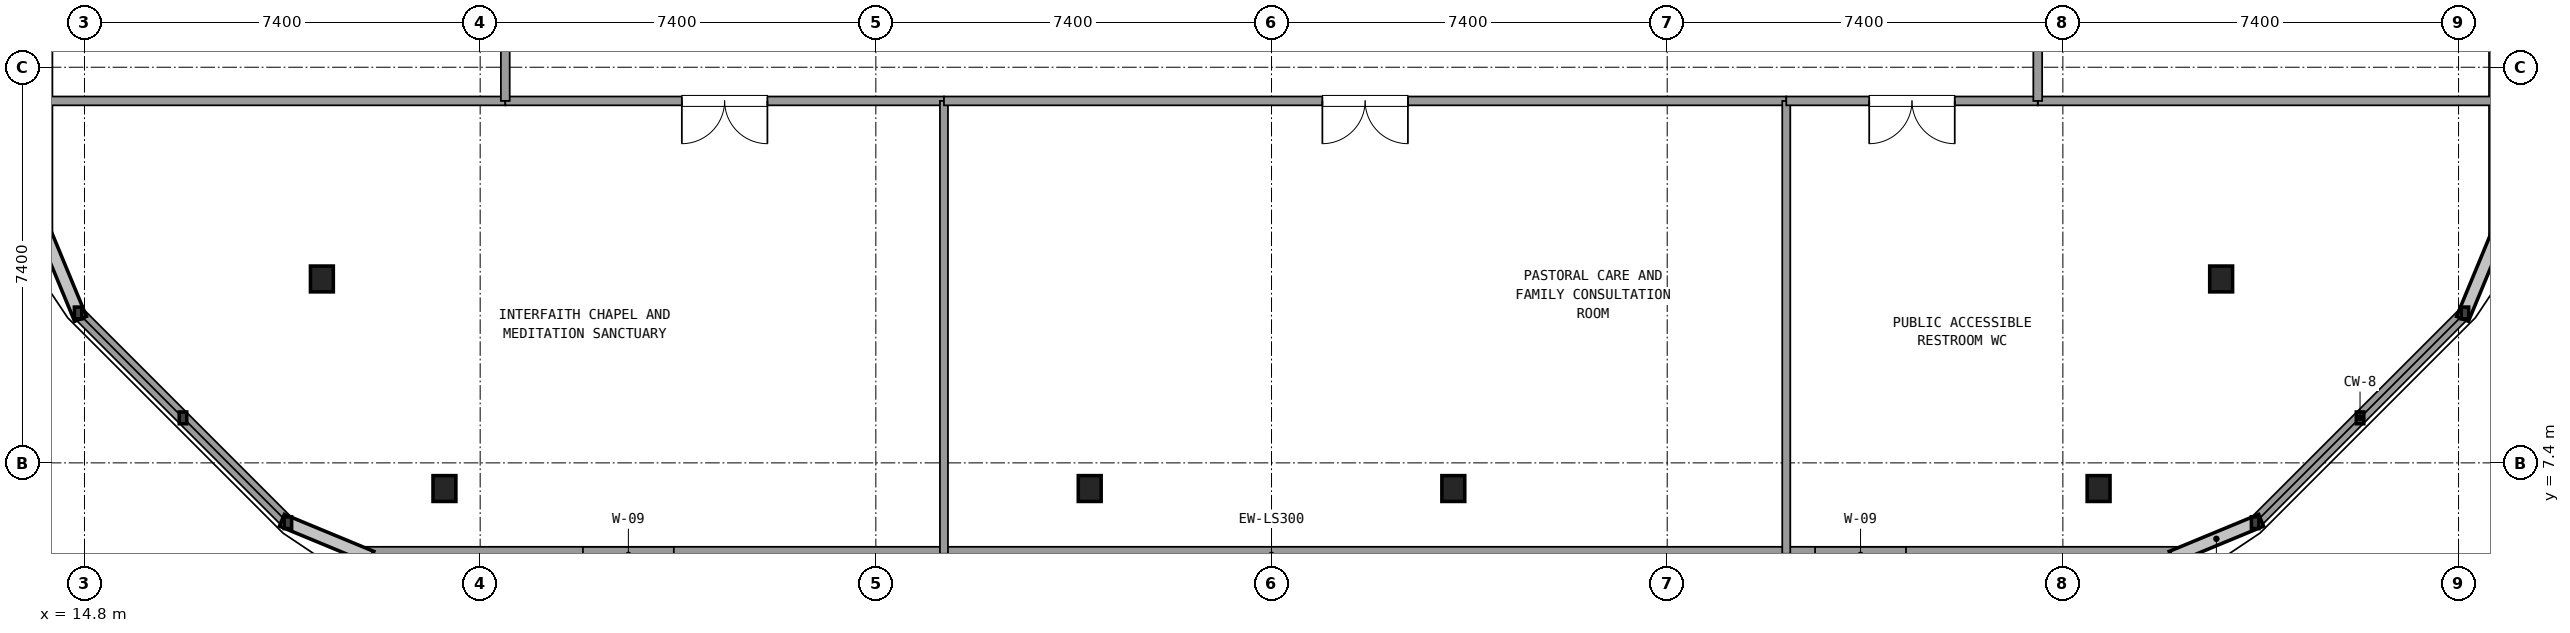
"""IFC4 building model, lengths in metres.
Left out: names, types, materials, properties, quantities, classifications, styles, units other than length and angle.
Written with IfcOpenShell. Run it as: python <this file> out.ifc"""

import sys

from ifc_helpers import new_model, si_unit, direction, frame, frame_2d, origin, origin_2d, place, context, subcontext, project, spatial, rectangle, i_section, extrude, element, fill, save


model = new_model("IFC4")
c1 = context("Model", 3, precision=1e-05, world=origin(), true_north=direction((0.0, 1.0)))
c2 = subcontext(c1, "Body", "Model", "MODEL_VIEW")
j1 = project(units=[si_unit("LENGTHUNIT", "METRE"), si_unit("PLANEANGLEUNIT", "RADIAN")], contexts=[c1])
p1 = place(None, origin())
s1 = spatial("IfcSite", under=j1, at=p1, CompositionType="ELEMENT")
p2 = place(p1, origin())
s2 = spatial("IfcBuilding", under=s1, at=p2, CompositionType="ELEMENT")
p3 = place(p2, frame((0.0, 0.0, 290.34)))
s3 = spatial("IfcBuildingStorey", under=s2, at=p3, CompositionType="ELEMENT", Elevation=290.34)
for number, where, z_axis, x_axis in (
    (1, (19.24, 10.84, 0.0), (0.0, 0.0, 1.0), (1.0, 0.0, 0.0)),
    (2, (21.532, 6.92, 0.0), (0.0, 0.0, 1.0), (1.0, 0.0, 0.0)),
    (3, (33.6, 6.92, 0.0), (0.0, 0.0, 1.0), (1.0, 0.0, 0.0)),
    (4, (40.4, 6.92, 0.0), (0.0, 0.0, 1.0), (1.0, 0.0, 0.0)),
    (5, (52.468, 6.92, 0.0), (0.0, 0.0, 1.0), (1.0, 0.0, 0.0)),
    (6, (54.76, 10.84, 0.0), (0.0, 0.0, 1.0), (1.0, 0.0, 0.0)),
):
    element("IfcColumn", number, at=place(p3, frame(where, z_axis=z_axis, x_axis=x_axis)), inside=s3, PredefinedType="COLUMN", context=c2, shape_type="SweptSolid", body=[
        extrude(i_section(OverallWidth=0.428, OverallDepth=0.483, WebThickness=0.042, FlangeThickness=0.068, at=origin_2d()), origin(), (0.0, 0.0, 1.0), 4.32),
    ])
p4 = place(p3, frame((20.055, 5.68, 0.0), z_axis=(0.0, 0.0, 1.0), x_axis=(1.0, 0.0, 0.0)))
e7 = element("IfcWall", 7, at=p4, inside=s3, PredefinedType="SOLIDWALL", context=c2, shape_type="SweptSolid", body=[
    extrude(rectangle(XDim=33.89, YDim=0.3, at=frame_2d((16.945, 0.0))), origin(), (0.0, 0.0, 1.0), 3.46),
])
p5 = place(p4, frame((4.067, 0.0, 0.85)))
e8 = element("IfcOpeningElement", 8, at=p5, cuts=e7, PredefinedType="OPENING", context=c2, shape_type="SweptSolid", body=[
    extrude(rectangle(XDim=1.7, YDim=1.75, at=frame_2d((0.85, 0.875))), frame((0.0, 0.16, 0.0), z_axis=(0.0, -1.0, 0.0), x_axis=(1.0, 0.0, 0.0)), (0.0, 0.0, 1.0), 0.32),
])
p6 = place(p4, frame((27.111, 0.0, 0.85)))
e9 = element("IfcOpeningElement", 9, at=p6, cuts=e7, PredefinedType="OPENING", context=c2, shape_type="SweptSolid", body=[
    extrude(rectangle(XDim=1.7, YDim=1.75, at=frame_2d((0.85, 0.875))), frame((0.0, 0.16, 0.0), z_axis=(0.0, -1.0, 0.0), x_axis=(1.0, 0.0, 0.0)), (0.0, 0.0, 1.0), 0.32),
])
p7 = place(p3, frame((55.396, 6.281, 0.0), z_axis=(0.0, 0.0, 1.0), x_axis=(0.707106781187, 0.707106781187, 0.0)))
e10 = element("IfcWall", 10, at=p7, inside=s3, PredefinedType="SOLIDWALL", context=c2, shape_type="SweptSolid", body=[
    extrude(rectangle(XDim=5.548, YDim=0.24, at=frame_2d((2.774, 0.0))), origin(), (0.0, 0.0, 1.0), 0.85),
])
p8 = place(p3, frame((59.92, 11.655, 0.0), z_axis=(0.0, 0.0, 1.0), x_axis=(0.0, 1.0, 0.0)))
e11 = element("IfcWall", 11, at=p8, inside=s3, PredefinedType="SOLIDWALL", context=c2, shape_type="SweptSolid", body=[
    extrude(rectangle(XDim=28.49, YDim=0.3, at=frame_2d((14.245, 0.0))), origin(), (0.0, 0.0, 1.0), 3.46),
])
p9 = place(p8, frame((7.122, 0.0, 0.85)))
e12 = element("IfcOpeningElement", 12, at=p9, cuts=e11, PredefinedType="OPENING", context=c2, shape_type="SweptSolid", body=[
    extrude(rectangle(XDim=1.9, YDim=1.7, at=frame_2d((0.95, 0.85))), frame((0.0, 0.16, 0.0), z_axis=(0.0, -1.0, 0.0), x_axis=(1.0, 0.0, 0.0)), (0.0, 0.0, 1.0), 0.32),
])
p10 = place(p8, frame((18.518, 0.0, 0.85)))
e13 = element("IfcOpeningElement", 13, at=p10, cuts=e11, PredefinedType="OPENING", context=c2, shape_type="SweptSolid", body=[
    extrude(rectangle(XDim=1.9, YDim=1.7, at=frame_2d((0.95, 0.85))), frame((0.0, 0.16, 0.0), z_axis=(0.0, -1.0, 0.0), x_axis=(1.0, 0.0, 0.0)), (0.0, 0.0, 1.0), 0.32),
])
p11 = place(p3, frame((14.08, 21.25, 0.0), z_axis=(0.0, 0.0, 1.0), x_axis=(0.0, -1.0, 0.0)))
e14 = element("IfcWall", 14, at=p11, inside=s3, PredefinedType="SOLIDWALL", context=c2, shape_type="SweptSolid", body=[
    extrude(rectangle(XDim=9.595, YDim=0.24, at=frame_2d((4.797, 0.0))), origin(), (0.0, 0.0, 1.0), 0.85),
])
p12 = place(p3, frame((14.681, 10.204, 0.0), z_axis=(0.0, 0.0, 1.0), x_axis=(0.707106781187, -0.707106781187, 0.0)))
e15 = element("IfcWall", 15, at=p12, inside=s3, PredefinedType="SOLIDWALL", context=c2, shape_type="SweptSolid", body=[
    extrude(rectangle(XDim=5.548, YDim=0.24, at=frame_2d((2.774, 0.0))), origin(), (0.0, 0.0, 1.0), 0.85),
])
for number, where, z_axis, x_axis in (
    (16, (14.1, 14.17, 0.0), (0.0, 0.0, 1.0), (1.0, 0.0, 0.0)),
    (17, (51.33, 14.17, 0.0), (0.0, 0.0, 1.0), (1.0, 0.0, 0.0)),
):
    element("IfcWall", number, at=place(p3, frame(where, z_axis=z_axis, x_axis=x_axis)), inside=s3, PredefinedType="PARTITIONING", context=c2, shape_type="SweptSolid", body=[
        extrude(rectangle(XDim=8.57, YDim=0.165, at=frame_2d((4.285, 0.0))), origin(), (0.0, 0.0, 1.0), 2.93),
    ])
p13 = place(p3, frame((22.67, 14.17, 0.0), z_axis=(0.0, 0.0, 1.0), x_axis=(1.0, 0.0, 0.0)))
e18 = element("IfcWall", 18, at=p13, inside=s3, PredefinedType="PARTITIONING", context=c2, shape_type="SweptSolid", body=[
    extrude(rectangle(XDim=8.204, YDim=0.165, at=frame_2d((4.102, 0.0))), origin(), (0.0, 0.0, 1.0), 2.93),
])
p14 = place(p13, frame((3.302, 0.0, 0.0)))
e19 = element("IfcOpeningElement", 19, at=p14, cuts=e18, PredefinedType="OPENING", context=c2, shape_type="SweptSolid", body=[
    extrude(rectangle(XDim=1.6, YDim=2.2, at=frame_2d((0.8, 1.1))), frame((0.0, 0.093, 0.0), z_axis=(0.0, -1.0, 0.0), x_axis=(1.0, 0.0, 0.0)), (0.0, 0.0, 1.0), 0.185),
])
p15 = place(p3, frame((30.874, 14.17, 0.0), z_axis=(0.0, 0.0, 1.0), x_axis=(0.0, -1.0, 0.0)))
e20 = element("IfcWall", 20, at=p15, inside=s3, PredefinedType="PARTITIONING", context=c2, shape_type="SweptSolid", body=[
    extrude(rectangle(XDim=8.47, YDim=0.15, at=frame_2d((4.235, 0.0))), origin(), (0.0, 0.0, 1.0), 2.93),
])
p16 = place(p3, frame((30.874, 14.17, 0.0), z_axis=(0.0, 0.0, 1.0), x_axis=(1.0, 0.0, 0.0)))
e21 = element("IfcWall", 21, at=p16, inside=s3, PredefinedType="PARTITIONING", context=c2, shape_type="SweptSolid", body=[
    extrude(rectangle(XDim=15.753, YDim=0.165, at=frame_2d((7.876, 0.0))), origin(), (0.0, 0.0, 1.0), 2.93),
])
p17 = place(p16, frame((7.077, 0.0, 0.0)))
e22 = element("IfcOpeningElement", 22, at=p17, cuts=e21, PredefinedType="OPENING", context=c2, shape_type="SweptSolid", body=[
    extrude(rectangle(XDim=1.6, YDim=2.2, at=frame_2d((0.8, 1.1))), frame((0.0, 0.093, 0.0), z_axis=(0.0, -1.0, 0.0), x_axis=(1.0, 0.0, 0.0)), (0.0, 0.0, 1.0), 0.185),
])
p18 = place(p3, frame((46.627, 14.17, 0.0), z_axis=(0.0, 0.0, 1.0), x_axis=(0.0, -1.0, 0.0)))
e23 = element("IfcWall", 23, at=p18, inside=s3, PredefinedType="PARTITIONING", context=c2, shape_type="SweptSolid", body=[
    extrude(rectangle(XDim=8.47, YDim=0.15, at=frame_2d((4.235, 0.0))), origin(), (0.0, 0.0, 1.0), 2.93),
])
p19 = place(p3, frame((46.627, 14.17, 0.0), z_axis=(0.0, 0.0, 1.0), x_axis=(1.0, 0.0, 0.0)))
e24 = element("IfcWall", 24, at=p19, inside=s3, PredefinedType="PARTITIONING", context=c2, shape_type="SweptSolid", body=[
    extrude(rectangle(XDim=4.703, YDim=0.165, at=frame_2d((2.352, 0.0))), origin(), (0.0, 0.0, 1.0), 2.93),
])
p20 = place(p19, frame((1.551, 0.0, 0.0)))
e25 = element("IfcOpeningElement", 25, at=p20, cuts=e24, PredefinedType="OPENING", context=c2, shape_type="SweptSolid", body=[
    extrude(rectangle(XDim=1.6, YDim=2.2, at=frame_2d((0.8, 1.1))), frame((0.0, 0.093, 0.0), z_axis=(0.0, -1.0, 0.0), x_axis=(1.0, 0.0, 0.0)), (0.0, 0.0, 1.0), 0.185),
])
p21 = place(p3, frame((22.67, 14.17, 0.0), z_axis=(0.0, 0.0, 1.0), x_axis=(0.0, 1.0, 0.0)))
e26 = element("IfcWall", 26, at=p21, inside=s3, PredefinedType="PARTITIONING", context=c2, shape_type="SweptSolid", body=[
    extrude(rectangle(XDim=23.46, YDim=0.165, at=frame_2d((11.73, 0.0))), origin(), (0.0, 0.0, 1.0), 2.93),
])
p22 = place(p21, frame((10.93, 0.0, 0.0)))
e27 = element("IfcOpeningElement", 27, at=p22, cuts=e26, PredefinedType="OPENING", context=c2, shape_type="SweptSolid", body=[
    extrude(rectangle(XDim=1.6, YDim=2.2, at=frame_2d((0.8, 1.1))), frame((0.0, 0.093, 0.0), z_axis=(0.0, -1.0, 0.0), x_axis=(1.0, 0.0, 0.0)), (0.0, 0.0, 1.0), 0.185),
])
p23 = place(p3, frame((51.33, 14.17, 0.0), z_axis=(0.0, 0.0, 1.0), x_axis=(0.0, 1.0, 0.0)))
e28 = element("IfcWall", 28, at=p23, inside=s3, PredefinedType="PARTITIONING", context=c2, shape_type="SweptSolid", body=[
    extrude(rectangle(XDim=23.46, YDim=0.165, at=frame_2d((11.73, 0.0))), origin(), (0.0, 0.0, 1.0), 2.93),
])
p24 = place(p23, frame((10.93, 0.0, 0.0)))
e29 = element("IfcOpeningElement", 29, at=p24, cuts=e28, PredefinedType="OPENING", context=c2, shape_type="SweptSolid", body=[
    extrude(rectangle(XDim=1.6, YDim=2.2, at=frame_2d((0.8, 1.1))), frame((0.0, 0.093, 0.0), z_axis=(0.0, -1.0, 0.0), x_axis=(1.0, 0.0, 0.0)), (0.0, 0.0, 1.0), 0.185),
])
p25 = place(p14, frame((1.6, 0.0, 0.0), z_axis=(0.0, 0.0, 1.0), x_axis=(-1.0, 0.0, 0.0)))
e30 = element("IfcDoor", 30, at=p25, inside=s3, OperationType="DOUBLE_DOOR_SINGLE_SWING", PredefinedType="DOOR", context=c2, shape_type="SweptSolid", body=[
    extrude(rectangle(XDim=1.6, YDim=2.2, at=frame_2d((0.8, 1.1))), frame((0.0, 0.025, 0.0), z_axis=(0.0, -1.0, 0.0), x_axis=(1.0, 0.0, 0.0)), (0.0, 0.0, 1.0), 0.05),
])
fill(e19, e30)
p26 = place(p17, frame((1.6, 0.0, 0.0), z_axis=(0.0, 0.0, 1.0), x_axis=(-1.0, 0.0, 0.0)))
e31 = element("IfcDoor", 31, at=p26, inside=s3, OperationType="DOUBLE_DOOR_SINGLE_SWING", PredefinedType="DOOR", context=c2, shape_type="SweptSolid", body=[
    extrude(rectangle(XDim=1.6, YDim=2.2, at=frame_2d((0.8, 1.1))), frame((0.0, 0.025, 0.0), z_axis=(0.0, -1.0, 0.0), x_axis=(1.0, 0.0, 0.0)), (0.0, 0.0, 1.0), 0.05),
])
fill(e22, e31)
p27 = place(p20, frame((1.6, 0.0, 0.0), z_axis=(0.0, 0.0, 1.0), x_axis=(-1.0, 0.0, 0.0)))
e32 = element("IfcDoor", 32, at=p27, inside=s3, OperationType="DOUBLE_DOOR_SINGLE_SWING", PredefinedType="DOOR", context=c2, shape_type="SweptSolid", body=[
    extrude(rectangle(XDim=1.6, YDim=2.2, at=frame_2d((0.8, 1.1))), frame((0.0, 0.025, 0.0), z_axis=(0.0, -1.0, 0.0), x_axis=(1.0, 0.0, 0.0)), (0.0, 0.0, 1.0), 0.05),
])
fill(e25, e32)
save(model, sys.argv[1])
